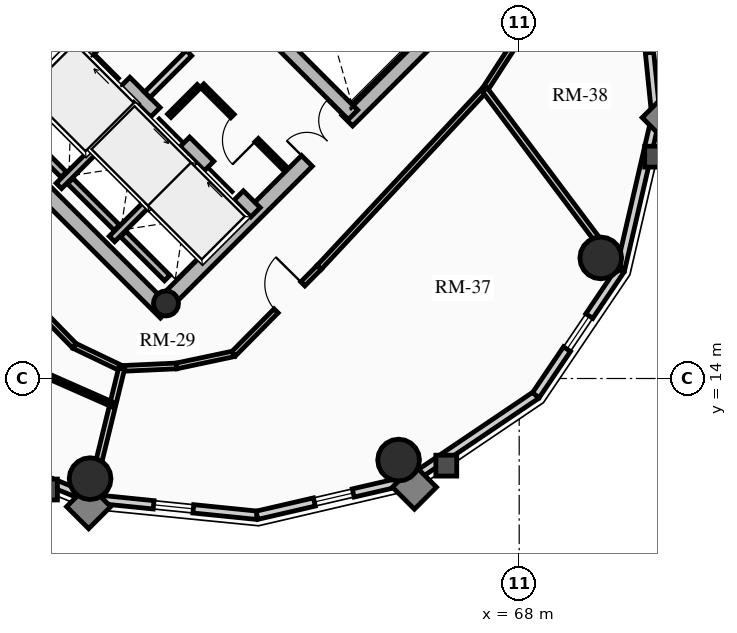
"""IFC4 building model, lengths in metres.
Left out: names, types, materials, properties, quantities, classifications, styles, units other than length and angle.
Written with IfcOpenShell. Run it as: python <this file> out.ifc"""

import sys

from ifc_helpers import new_model, si_unit, direction, frame, frame_2d, origin, origin_2d, place, context, subcontext, project, spatial, rectangle, circle, hollow_circle, extrude, source, transform, mapped, element, fill, save


model = new_model("IFC4")
c1 = context("Model", 3, precision=1e-05, world=origin(), true_north=direction((0.0, 1.0)))
c2 = subcontext(c1, "Body", "Model", "MODEL_VIEW")
j1 = project(units=[si_unit("LENGTHUNIT", "METRE"), si_unit("PLANEANGLEUNIT", "RADIAN")], contexts=[c1])
p1 = place(None, origin())
s1 = spatial("IfcSite", under=j1, at=p1, CompositionType="ELEMENT")
p2 = place(p1, origin())
s2 = spatial("IfcBuilding", under=s1, at=p2, CompositionType="ELEMENT")
p3 = place(p2, frame((0.0, 0.0, 219.94)))
s3 = spatial("IfcBuildingStorey", under=s2, at=p3, CompositionType="ELEMENT", Elevation=219.94)
p4 = place(p3, frame((58.702, 15.732, 0.0), z_axis=(0.0, 0.0, 1.0), x_axis=(-0.707106781187, 0.707106781187, 0.0)))
e1 = element("IfcWall", 1, at=p4, inside=s3, PredefinedType="SHEAR", context=c2, shape_type="SweptSolid", body=[
    extrude(rectangle(XDim=14.1, YDim=0.4, at=frame_2d((7.05, 0.0))), origin(), (0.0, 0.0, 1.0), 2.91),
])
p5 = place(p3, frame((58.561, 15.873, 0.0), z_axis=(0.0, 0.0, 1.0), x_axis=(0.707106781187, 0.707106781187, 0.0)))
e2 = element("IfcWall", 2, at=p5, inside=s3, PredefinedType="SHEAR", context=c2, shape_type="SweptSolid", body=[
    extrude(rectangle(XDim=10.7, YDim=0.4, at=frame_2d((5.35, 0.0))), origin(), (0.0, 0.0, 1.0), 2.91),
])
m1 = source(origin(), c2, "Body", "SweptSolid", [
    extrude(rectangle(XDim=1.5, YDim=2.02, at=frame_2d((0.75, 1.01))), frame((0.0, 0.21, 0.0), z_axis=(0.0, -1.0, 0.0), x_axis=(1.0, 0.0, 0.0)), (0.0, 0.0, 1.0), 0.42),
])
p6 = place(p5, frame((5.45, 0.0, 0.0)))
e3 = element("IfcOpeningElement", 3, at=p6, cuts=e2, PredefinedType="OPENING", context=c2, shape_type="MappedRepresentation", body=[
    mapped(m1, transform((0.0, 0.0, 0.0), x_axis=(1.0, 0.0, 0.0), y_axis=(0.0, 1.0, 0.0), z_axis=(0.0, 0.0, 1.0), scale=1.0)),
])
p7 = place(p3, frame((61.06, 18.373, 0.0), z_axis=(0.0, 0.0, 1.0), x_axis=(-0.707106781187, 0.707106781187, 0.0)))
e4 = element("IfcWall", 4, at=p7, inside=s3, PredefinedType="SHEAR", context=c2, shape_type="SweptSolid", body=[
    extrude(rectangle(XDim=13.7, YDim=0.35, at=frame_2d((6.85, 0.0))), origin(), (0.0, 0.0, 1.0), 2.91),
])
m2 = source(origin(), c2, "Body", "SweptSolid", [
    extrude(rectangle(XDim=1.1, YDim=2.015, at=frame_2d((0.55, 1.007))), frame((0.0, 0.185, 0.0), z_axis=(0.0, -1.0, 0.0), x_axis=(1.0, 0.0, 0.0)), (0.0, 0.0, 1.0), 0.37),
])
p8 = place(p7, frame((4.85, 0.0, 0.0)))
e5 = element("IfcOpeningElement", 5, at=p8, cuts=e4, PredefinedType="OPENING", context=c2, shape_type="MappedRepresentation", body=[
    mapped(m2, transform((0.0, 0.0, 0.0), x_axis=(1.0, 0.0, 0.0), y_axis=(0.0, 1.0, 0.0), z_axis=(0.0, 0.0, 1.0), scale=1.0)),
])
p9 = place(p7, frame((0.625, 0.0, 0.0)))
e6 = element("IfcOpeningElement", 6, at=p9, cuts=e4, PredefinedType="OPENING", context=c2, shape_type="MappedRepresentation", body=[
    mapped(m2, transform((0.0, 0.0, 0.0), x_axis=(1.0, 0.0, 0.0), y_axis=(0.0, 1.0, 0.0), z_axis=(0.0, 0.0, 1.0), scale=1.0)),
])
p10 = place(p7, frame((2.625, 0.0, 0.0)))
e7 = element("IfcOpeningElement", 7, at=p10, cuts=e4, PredefinedType="OPENING", context=c2, shape_type="MappedRepresentation", body=[
    mapped(m2, transform((0.0, 0.0, 0.0), x_axis=(1.0, 0.0, 0.0), y_axis=(0.0, 1.0, 0.0), z_axis=(0.0, 0.0, 1.0), scale=1.0)),
])
m3 = source(origin(), c2, "Body", "SweptSolid", [
    extrude(rectangle(XDim=1.15, YDim=2.02, at=frame_2d((0.575, 1.01))), frame((0.0, 0.185, 0.0), z_axis=(0.0, -1.0, 0.0), x_axis=(1.0, 0.0, 0.0)), (0.0, 0.0, 1.0), 0.37),
])
p11 = place(p7, frame((7.27, 0.0, 0.0)))
e8 = element("IfcOpeningElement", 8, at=p11, cuts=e4, PredefinedType="OPENING", context=c2, shape_type="MappedRepresentation", body=[
    mapped(m3, transform((0.0, 0.0, 0.0), x_axis=(1.0, 0.0, 0.0), y_axis=(0.0, 1.0, 0.0), z_axis=(0.0, 0.0, 1.0), scale=1.0)),
])
p12 = place(p3, frame((63.627, 20.94, 0.0), z_axis=(0.0, 0.0, 1.0), x_axis=(-0.707119496762, 0.707094065383, 0.0)))
e9 = element("IfcWall", 9, at=p12, inside=s3, PredefinedType="SHEAR", context=c2, shape_type="SweptSolid", body=[
    extrude(rectangle(XDim=9.6, YDim=0.35, at=frame_2d((4.8, 0.0))), origin(), (0.0, 0.0, 1.0), 2.91),
])
p13 = place(p12, frame((5.28, 0.0, 0.0)))
e10 = element("IfcOpeningElement", 10, at=p13, cuts=e9, PredefinedType="OPENING", context=c2, shape_type="MappedRepresentation", body=[
    mapped(m3, transform((0.0, 0.0, 0.0), x_axis=(1.0, 0.0, 0.0), y_axis=(0.0, 1.0, 0.0), z_axis=(0.0, 0.0, 1.0), scale=1.0)),
])
p14 = place(p3, frame((53.784, 21.003, 0.0), z_axis=(0.0, 0.0, 1.0), x_axis=(0.707106781187, 0.707106781187, 0.0)))
e11 = element("IfcWall", 11, at=p14, inside=s3, PredefinedType="SHEAR", context=c2, shape_type="SweptSolid", body=[
    extrude(rectangle(XDim=3.285, YDim=0.35, at=frame_2d((1.643, 0.0))), origin(), (0.0, 0.0, 1.0), 2.91),
])
p15 = place(p3, frame((58.706, 15.976, 0.0), z_axis=(0.0, 0.0, 1.0), x_axis=(0.707106781187, 0.707106781187, 0.0)))
e12 = element("IfcColumn", 12, at=p15, inside=s3, PredefinedType="COLUMN", context=c2, shape_type="SweptSolid", body=[
    extrude(hollow_circle(Radius=0.33, WallThickness=0.025, at=origin_2d()), origin(), (0.0, 0.0, 1.0), 2.91),
])
for number, where, z_axis, x_axis in (
    (13, (56.709, 11.365, 0.0), (0.0, 0.0, 1.0), (1.0, 0.0, 0.0)),
    (14, (64.827, 11.854, 0.0), (0.0, 0.0, 1.0), (1.0, 0.0, 0.0)),
    (15, (70.146, 17.173, 0.0), (0.0, 0.0, 1.0), (1.0, 0.0, 0.0)),
):
    element("IfcColumn", number, at=place(p3, frame(where, z_axis=z_axis, x_axis=x_axis)), inside=s3, PredefinedType="USERDEFINED", context=c2, shape_type="SweptSolid", body=[
        extrude(circle(Radius=0.55, at=origin_2d()), origin(), (0.0, 0.0, 1.0), 2.91),
    ])
p16 = place(p3, frame((56.705, 10.845, 0.0), z_axis=(0.0, 0.0, 1.0), x_axis=(-0.924447353237, 0.381309704956, 0.0)))
e16 = element("IfcWall", 16, at=p16, inside=s3, PredefinedType="SOLIDWALL", context=c2, shape_type="SweptSolid", body=[
    extrude(rectangle(XDim=4.671, YDim=0.22, at=frame_2d((2.335, 0.0))), origin(), (0.0, 0.0, 1.0), 2.322),
])
p17 = place(p3, frame((61.1, 10.401, 0.0), z_axis=(0.0, 0.0, 1.0), x_axis=(-0.994929930991, 0.100570534541, 0.0)))
e17 = element("IfcWall", 17, at=p17, inside=s3, PredefinedType="SOLIDWALL", context=c2, shape_type="SweptSolid", body=[
    extrude(rectangle(XDim=4.418, YDim=0.22, at=frame_2d((2.209, 0.0))), origin(), (0.0, 0.0, 1.0), 2.322),
])
m4 = source(origin(), c2, "Body", "SweptSolid", [
    extrude(rectangle(XDim=1.05, YDim=1.3, at=frame_2d((0.525, 0.65))), frame((0.0, 0.12, 0.0), z_axis=(0.0, -1.0, 0.0), x_axis=(1.0, 0.0, 0.0)), (0.0, 0.0, 1.0), 0.24),
])
p18 = place(p17, frame((1.684, 0.0, 0.65)))
e18 = element("IfcOpeningElement", 18, at=p18, cuts=e17, PredefinedType="OPENING", context=c2, shape_type="MappedRepresentation", body=[
    mapped(m4, transform((0.0, 0.0, 0.0), x_axis=(1.0, 0.0, 0.0), y_axis=(0.0, 1.0, 0.0), z_axis=(0.0, 0.0, 1.0), scale=1.0)),
])
p19 = place(p3, frame((65.144, 11.337, 0.0), z_axis=(0.0, 0.0, 1.0), x_axis=(-0.974249228678, -0.225473813158, 0.0)))
e19 = element("IfcWall", 19, at=p19, inside=s3, PredefinedType="SOLIDWALL", context=c2, shape_type="SweptSolid", body=[
    extrude(rectangle(XDim=4.15, YDim=0.22, at=frame_2d((2.075, 0.0))), origin(), (0.0, 0.0, 1.0), 2.322),
])
p20 = place(p19, frame((1.55, 0.0, 0.65)))
e20 = element("IfcOpeningElement", 20, at=p20, cuts=e19, PredefinedType="OPENING", context=c2, shape_type="MappedRepresentation", body=[
    mapped(m4, transform((0.0, 0.0, 0.0), x_axis=(1.0, 0.0, 0.0), y_axis=(0.0, 1.0, 0.0), z_axis=(0.0, 0.0, 1.0), scale=1.0)),
])
p21 = place(p3, frame((68.439, 13.561, 0.0), z_axis=(0.0, 0.0, 1.0), x_axis=(-0.828833723692, -0.559495003079, 0.0)))
e21 = element("IfcWall", 21, at=p21, inside=s3, PredefinedType="SOLIDWALL", context=c2, shape_type="SweptSolid", body=[
    extrude(rectangle(XDim=3.976, YDim=0.22, at=frame_2d((1.988, 0.0))), origin(), (0.0, 0.0, 1.0), 2.322),
])
p22 = place(p3, frame((70.663, 16.856, 0.0), z_axis=(0.0, 0.0, 1.0), x_axis=(-0.559495003079, -0.828833723692, 0.0)))
e22 = element("IfcWall", 22, at=p22, inside=s3, PredefinedType="SOLIDWALL", context=c2, shape_type="SweptSolid", body=[
    extrude(rectangle(XDim=3.976, YDim=0.22, at=frame_2d((1.988, 0.0))), origin(), (0.0, 0.0, 1.0), 2.322),
])
p23 = place(p22, frame((1.463, 0.0, 0.65)))
e23 = element("IfcOpeningElement", 23, at=p23, cuts=e22, PredefinedType="OPENING", context=c2, shape_type="MappedRepresentation", body=[
    mapped(m4, transform((0.0, 0.0, 0.0), x_axis=(1.0, 0.0, 0.0), y_axis=(0.0, 1.0, 0.0), z_axis=(0.0, 0.0, 1.0), scale=1.0)),
])
p24 = place(p3, frame((71.599, 20.9, 0.0), z_axis=(0.0, 0.0, 1.0), x_axis=(-0.225473813158, -0.974249228678, 0.0)))
e24 = element("IfcWall", 24, at=p24, inside=s3, PredefinedType="SOLIDWALL", context=c2, shape_type="SweptSolid", body=[
    extrude(rectangle(XDim=4.15, YDim=0.22, at=frame_2d((2.075, 0.0))), origin(), (0.0, 0.0, 1.0), 2.322),
])
p25 = place(p3, frame((71.155, 25.295, 0.0), z_axis=(0.0, 0.0, 1.0), x_axis=(0.100570534541, -0.994929930991, 0.0)))
e25 = element("IfcWall", 25, at=p25, inside=s3, PredefinedType="SOLIDWALL", context=c2, shape_type="SweptSolid", body=[
    extrude(rectangle(XDim=4.418, YDim=0.22, at=frame_2d((2.209, 0.0))), origin(), (0.0, 0.0, 1.0), 2.322),
])
p26 = place(p25, frame((1.684, 0.0, 0.65)))
e26 = element("IfcOpeningElement", 26, at=p26, cuts=e25, PredefinedType="OPENING", context=c2, shape_type="MappedRepresentation", body=[
    mapped(m4, transform((0.0, 0.0, 0.0), x_axis=(1.0, 0.0, 0.0), y_axis=(0.0, 1.0, 0.0), z_axis=(0.0, 0.0, 1.0), scale=1.0)),
])
p27 = place(p3, frame((55.888, 19.069, 0.0), z_axis=(0.0, 0.0, 1.0), x_axis=(0.707106781187, 0.707106781187, 0.0)))
e27 = element("IfcWall", 27, at=p27, inside=s3, PredefinedType="SHEAR", context=c2, shape_type="SweptSolid", body=[
    extrude(rectangle(XDim=2.97, YDim=0.2, at=frame_2d((1.485, 0.0))), origin(), (0.0, 0.0, 1.0), 2.91),
])
p28 = place(p3, frame((56.015, 19.366, 0.0), z_axis=(0.0, 0.0, 1.0), x_axis=(-0.707106781187, 0.707106781187, 0.0)))
e28 = element("IfcWall", 28, at=p28, inside=s3, PredefinedType="SHEAR", context=c2, shape_type="SweptSolid", body=[
    extrude(rectangle(XDim=2.44, YDim=0.2, at=frame_2d((1.22, 0.0))), origin(), (0.0, 0.0, 1.0), 2.91),
])
p29 = place(p3, frame((57.284, 17.673, 0.0), z_axis=(0.0, 0.0, 1.0), x_axis=(0.707147878904, 0.70706568108, 0.0)))
e29 = element("IfcWall", 29, at=p29, inside=s3, PredefinedType="SHEAR", context=c2, shape_type="SweptSolid", body=[
    extrude(rectangle(XDim=2.97, YDim=0.2, at=frame_2d((1.485, 0.0))), origin(), (0.0, 0.0, 1.0), 2.91),
])
p30 = place(p3, frame((57.412, 17.97, 0.0), z_axis=(0.0, 0.0, 1.0), x_axis=(-0.707106781187, 0.707106781187, 0.0)))
e30 = element("IfcWall", 30, at=p30, inside=s3, PredefinedType="SHEAR", context=c2, shape_type="SweptSolid", body=[
    extrude(rectangle(XDim=1.735, YDim=0.2, at=frame_2d((0.867, 0.0))), origin(), (0.0, 0.0, 1.0), 2.91),
])
p31 = place(p3, frame((58.737, 16.644, 0.0), z_axis=(0.0, 0.0, 1.0), x_axis=(-0.707032117043, 0.707181437447, 0.0)))
e31 = element("IfcWall", 31, at=p31, inside=s3, PredefinedType="SHEAR", context=c2, shape_type="SweptSolid", body=[
    extrude(rectangle(XDim=1.635, YDim=0.2, at=frame_2d((0.817, 0.0))), origin(), (0.0, 0.0, 1.0), 2.91),
])
p32 = place(p3, frame((58.214, 21.467, 0.0), z_axis=(0.0, 0.0, 1.0), x_axis=(0.707106781187, 0.707106781187, 0.0)))
e32 = element("IfcWall", 32, at=p32, inside=s3, PredefinedType="PARTITIONING", context=c2, shape_type="SweptSolid", body=[
    extrude(rectangle(XDim=3.28, YDim=0.2, at=frame_2d((1.64, 0.0))), origin(), (0.0, 0.0, 1.0), 2.685),
])
m5 = source(origin(), c2, "Body", "SweptSolid", [
    extrude(rectangle(XDim=1.5, YDim=2.02, at=frame_2d((0.75, 1.01))), frame((0.0, 0.11, 0.0), z_axis=(0.0, -1.0, 0.0), x_axis=(1.0, 0.0, 0.0)), (0.0, 0.0, 1.0), 0.22),
])
p33 = place(p32, frame((1.55, 0.0, 0.0)))
e33 = element("IfcOpeningElement", 33, at=p33, cuts=e32, PredefinedType="OPENING", context=c2, shape_type="MappedRepresentation", body=[
    mapped(m5, transform((0.0, 0.0, 0.0), x_axis=(1.0, 0.0, 0.0), y_axis=(0.0, 1.0, 0.0), z_axis=(0.0, 0.0, 1.0), scale=1.0)),
])
p34 = place(p3, frame((61.835, 19.529, 0.0), z_axis=(0.0, 0.0, 1.0), x_axis=(-0.707146413884, 0.707067146267, 0.0)))
e34 = element("IfcWall", 34, at=p34, inside=s3, PredefinedType="PARTITIONING", context=c2, shape_type="SweptSolid", body=[
    extrude(rectangle(XDim=3.08, YDim=0.125, at=frame_2d((1.54, 0.0))), origin(), (0.0, 0.0, 1.0), 2.685),
])
m6 = source(origin(), c2, "Body", "SweptSolid", [
    extrude(rectangle(XDim=0.9, YDim=2.005, at=frame_2d((0.45, 1.002))), frame((0.0, 0.073, 0.0), z_axis=(0.0, -1.0, 0.0), x_axis=(1.0, 0.0, 0.0)), (0.0, 0.0, 1.0), 0.145),
])
p35 = place(p34, frame((1.05, 0.0, 0.0)))
e35 = element("IfcOpeningElement", 35, at=p35, cuts=e34, PredefinedType="OPENING", context=c2, shape_type="MappedRepresentation", body=[
    mapped(m6, transform((0.0, 0.0, 0.0), x_axis=(1.0, 0.0, 0.0), y_axis=(0.0, 1.0, 0.0), z_axis=(0.0, 0.0, 1.0), scale=1.0)),
])
p36 = place(p3, frame((58.794, 20.915, 0.0), z_axis=(0.0, 0.0, 1.0), x_axis=(0.707106781187, 0.707106781187, 0.0)))
e36 = element("IfcWall", 36, at=p36, inside=s3, PredefinedType="PARTITIONING", context=c2, shape_type="SweptSolid", body=[
    extrude(rectangle(XDim=1.1, YDim=0.125, at=frame_2d((0.55, 0.0))), origin(), (0.0, 0.0, 1.0), 2.685),
])
p37 = place(p3, frame((52.126, 19.126, 0.0), z_axis=(0.0, 0.0, 1.0), x_axis=(0.698979087027, -0.715142108884, 0.0)))
e37 = element("IfcWall", 37, at=p37, inside=s3, PredefinedType="PARTITIONING", context=c2, shape_type="SweptSolid", body=[
    extrude(rectangle(XDim=5.966, YDim=0.15, at=frame_2d((2.983, 0.0))), origin(), (0.0, 0.0, 1.0), 2.322),
])
m7 = source(origin(), c2, "Body", "SweptSolid", [
    extrude(rectangle(XDim=1.05, YDim=2.015, at=frame_2d((0.525, 1.007))), frame((0.0, 0.085, 0.0), z_axis=(0.0, -1.0, 0.0), x_axis=(1.0, 0.0, 0.0)), (0.0, 0.0, 1.0), 0.17),
])
p38 = place(p37, frame((2.458, 0.0, 0.0)))
e38 = element("IfcOpeningElement", 38, at=p38, cuts=e37, PredefinedType="OPENING", context=c2, shape_type="MappedRepresentation", body=[
    mapped(m7, transform((0.0, 0.0, 0.0), x_axis=(1.0, 0.0, 0.0), y_axis=(0.0, 1.0, 0.0), z_axis=(0.0, 0.0, 1.0), scale=1.0)),
])
p39 = place(p3, frame((56.296, 14.859, 0.0), z_axis=(0.0, 0.0, 1.0), x_axis=(0.90178292445, -0.432189260823, 0.0)))
e39 = element("IfcWall", 39, at=p39, inside=s3, PredefinedType="PARTITIONING", context=c2, shape_type="SweptSolid", body=[
    extrude(rectangle(XDim=1.377, YDim=0.15, at=frame_2d((0.688, 0.0))), origin(), (0.0, 0.0, 1.0), 2.255),
])
p40 = place(p3, frame((57.538, 14.264, 0.0), z_axis=(0.0, 0.0, 1.0), x_axis=(0.99892990172, 0.046249880546, 0.0)))
e40 = element("IfcWall", 40, at=p40, inside=s3, PredefinedType="PARTITIONING", context=c2, shape_type="SweptSolid", body=[
    extrude(rectangle(XDim=1.446, YDim=0.15, at=frame_2d((0.723, 0.0))), origin(), (0.0, 0.0, 1.0), 2.322),
])
p41 = place(p3, frame((58.983, 14.331, 0.0), z_axis=(0.0, 0.0, 1.0), x_axis=(0.978328007546, 0.207061125397, 0.0)))
e41 = element("IfcWall", 41, at=p41, inside=s3, PredefinedType="PARTITIONING", context=c2, shape_type="SweptSolid", body=[
    extrude(rectangle(XDim=1.534, YDim=0.15, at=frame_2d((0.767, 0.0))), origin(), (0.0, 0.0, 1.0), 2.255),
])
p42 = place(p3, frame((60.484, 14.648, 0.0), z_axis=(0.0, 0.0, 1.0), x_axis=(0.703398221944, 0.710795991383, 0.0)))
e42 = element("IfcWall", 42, at=p42, inside=s3, PredefinedType="PARTITIONING", context=c2, shape_type="SweptSolid", body=[
    extrude(rectangle(XDim=3.201, YDim=0.15, at=frame_2d((1.601, 0.0))), origin(), (0.0, 0.0, 1.0), 2.322),
])
m8 = source(origin(), c2, "Body", "SweptSolid", [
    extrude(rectangle(XDim=1.0, YDim=2.015, at=frame_2d((0.5, 1.007))), frame((0.0, 0.085, 0.0), z_axis=(0.0, -1.0, 0.0), x_axis=(1.0, 0.0, 0.0)), (0.0, 0.0, 1.0), 0.17),
])
p43 = place(p42, frame((1.591, 0.0, 0.0)))
e43 = element("IfcOpeningElement", 43, at=p43, cuts=e42, PredefinedType="OPENING", context=c2, shape_type="MappedRepresentation", body=[
    mapped(m8, transform((0.0, 0.0, 0.0), x_axis=(1.0, 0.0, 0.0), y_axis=(0.0, 1.0, 0.0), z_axis=(0.0, 0.0, 1.0), scale=1.0)),
])
p44 = place(p3, frame((62.736, 16.924, 0.0), z_axis=(0.0, 0.0, 1.0), x_axis=(0.681946700833, 0.731401871219, 0.0)))
e44 = element("IfcWall", 44, at=p44, inside=s3, PredefinedType="PARTITIONING", context=c2, shape_type="SweptSolid", body=[
    extrude(rectangle(XDim=6.393, YDim=0.15, at=frame_2d((3.196, 0.0))), origin(), (0.0, 0.0, 1.0), 2.255),
])
p45 = place(p3, frame((67.095, 21.6, 0.0), z_axis=(0.0, 0.0, 1.0), x_axis=(0.543773190184, 0.839232219137, 0.0)))
e45 = element("IfcWall", 45, at=p45, inside=s3, PredefinedType="PARTITIONING", context=c2, shape_type="SweptSolid", body=[
    extrude(rectangle(XDim=1.823, YDim=0.15, at=frame_2d((0.911, 0.0))), origin(), (0.0, 0.0, 1.0), 2.255),
])
p46 = place(p3, frame((57.538, 14.264, 0.0), z_axis=(0.0, 0.0, 1.0), x_axis=(-0.237377006249, -0.971417601706, 0.0)))
e46 = element("IfcWall", 46, at=p46, inside=s3, PredefinedType="PARTITIONING", context=c2, shape_type="SweptSolid", body=[
    extrude(rectangle(XDim=3.499, YDim=0.16, at=frame_2d((1.75, 0.0))), origin(), (0.0, 0.0, 1.0), 2.322),
])
p47 = place(p3, frame((67.095, 21.6, 0.0), z_axis=(0.0, 0.0, 1.0), x_axis=(0.599947190798, -0.800039604178, 0.0)))
e47 = element("IfcWall", 47, at=p47, inside=s3, PredefinedType="PARTITIONING", context=c2, shape_type="SweptSolid", body=[
    extrude(rectangle(XDim=5.918, YDim=0.16, at=frame_2d((2.959, 0.0))), origin(), (0.0, 0.0, 1.0), 2.322),
])
p48 = place(p3, frame((55.204, 14.239, 0.0), z_axis=(0.0, 0.0, 1.0), x_axis=(0.914999746908, -0.403454412738, 0.0)))
e48 = element("IfcWall", 48, at=p48, inside=s3, PredefinedType="PARTITIONING", context=c2, shape_type="SweptSolid", body=[
    extrude(rectangle(XDim=2.297, YDim=0.125, at=frame_2d((1.148, 0.0))), origin(), (0.0, 0.0, 1.0), 2.255),
])
m9 = source(origin(), c2, "Body", "SweptSolid", [
    extrude(rectangle(XDim=1.05, YDim=1.3, at=frame_2d((0.525, 0.65))), frame((0.0, 0.03, 0.0), z_axis=(0.0, -1.0, 0.0), x_axis=(1.0, 0.0, 0.0)), (0.0, 0.0, 1.0), 0.06),
])
p49 = place(p18, origin())
e49 = element("IfcWindow", 49, at=p49, inside=s3, PartitioningType="SINGLE_PANEL", PredefinedType="WINDOW", context=c2, shape_type="MappedRepresentation", body=[
    mapped(m9, transform((0.0, 0.0, 0.0), x_axis=(1.0, 0.0, 0.0), y_axis=(0.0, 1.0, 0.0), z_axis=(0.0, 0.0, 1.0), scale=1.0)),
])
fill(e18, e49)
p50 = place(p20, origin())
e50 = element("IfcWindow", 50, at=p50, inside=s3, PartitioningType="SINGLE_PANEL", PredefinedType="WINDOW", context=c2, shape_type="MappedRepresentation", body=[
    mapped(m9, transform((0.0, 0.0, 0.0), x_axis=(1.0, 0.0, 0.0), y_axis=(0.0, 1.0, 0.0), z_axis=(0.0, 0.0, 1.0), scale=1.0)),
])
fill(e20, e50)
p51 = place(p23, origin())
e51 = element("IfcWindow", 51, at=p51, inside=s3, PartitioningType="SINGLE_PANEL", PredefinedType="WINDOW", context=c2, shape_type="MappedRepresentation", body=[
    mapped(m9, transform((0.0, 0.0, 0.0), x_axis=(1.0, 0.0, 0.0), y_axis=(0.0, 1.0, 0.0), z_axis=(0.0, 0.0, 1.0), scale=1.0)),
])
fill(e23, e51)
p52 = place(p26, origin())
e52 = element("IfcWindow", 52, at=p52, inside=s3, PartitioningType="SINGLE_PANEL", PredefinedType="WINDOW", context=c2, shape_type="MappedRepresentation", body=[
    mapped(m9, transform((0.0, 0.0, 0.0), x_axis=(1.0, 0.0, 0.0), y_axis=(0.0, 1.0, 0.0), z_axis=(0.0, 0.0, 1.0), scale=1.0)),
])
fill(e26, e52)
m10 = source(origin(), c2, "Body", "SweptSolid", [
    extrude(rectangle(XDim=1.1, YDim=2.015, at=frame_2d((0.55, 1.007))), frame((0.0, 0.025, 0.0), z_axis=(0.0, -1.0, 0.0), x_axis=(1.0, 0.0, 0.0)), (0.0, 0.0, 1.0), 0.05),
])
p53 = place(p8, origin())
e53 = element("IfcDoor", 53, at=p53, inside=s3, OperationType="SLIDING_TO_RIGHT", PredefinedType="DOOR", context=c2, shape_type="MappedRepresentation", body=[
    mapped(m10, transform((0.0, 0.0, 0.0), x_axis=(1.0, 0.0, 0.0), y_axis=(0.0, 1.0, 0.0), z_axis=(0.0, 0.0, 1.0), scale=1.0)),
])
fill(e5, e53)
p54 = place(p9, origin())
e54 = element("IfcDoor", 54, at=p54, inside=s3, OperationType="SLIDING_TO_RIGHT", PredefinedType="DOOR", context=c2, shape_type="MappedRepresentation", body=[
    mapped(m10, transform((0.0, 0.0, 0.0), x_axis=(1.0, 0.0, 0.0), y_axis=(0.0, 1.0, 0.0), z_axis=(0.0, 0.0, 1.0), scale=1.0)),
])
fill(e6, e54)
p55 = place(p10, origin())
e55 = element("IfcDoor", 55, at=p55, inside=s3, OperationType="SLIDING_TO_LEFT", PredefinedType="DOOR", context=c2, shape_type="MappedRepresentation", body=[
    mapped(m10, transform((0.0, 0.0, 0.0), x_axis=(1.0, 0.0, 0.0), y_axis=(0.0, 1.0, 0.0), z_axis=(0.0, 0.0, 1.0), scale=1.0)),
])
fill(e7, e55)
m11 = source(origin(), c2, "Body", "SweptSolid", [
    extrude(rectangle(XDim=1.5, YDim=2.02, at=frame_2d((0.75, 1.01))), frame((0.0, 0.025, 0.0), z_axis=(0.0, -1.0, 0.0), x_axis=(1.0, 0.0, 0.0)), (0.0, 0.0, 1.0), 0.05),
])
p56 = place(p6, origin())
e56 = element("IfcDoor", 56, at=p56, inside=s3, OperationType="DOUBLE_DOOR_SINGLE_SWING", PredefinedType="DOOR", context=c2, shape_type="MappedRepresentation", body=[
    mapped(m11, transform((0.0, 0.0, 0.0), x_axis=(1.0, 0.0, 0.0), y_axis=(0.0, 1.0, 0.0), z_axis=(0.0, 0.0, 1.0), scale=1.0)),
])
fill(e3, e56)
p57 = place(p33, origin())
e57 = element("IfcDoor", 57, at=p57, inside=s3, OperationType="DOUBLE_DOOR_SINGLE_SWING", PredefinedType="DOOR", context=c2, shape_type="MappedRepresentation", body=[
    mapped(m11, transform((0.0, 0.0, 0.0), x_axis=(1.0, 0.0, 0.0), y_axis=(0.0, 1.0, 0.0), z_axis=(0.0, 0.0, 1.0), scale=1.0)),
])
fill(e33, e57)
m12 = source(origin(), c2, "Body", "SweptSolid", [
    extrude(rectangle(XDim=0.9, YDim=2.005, at=frame_2d((0.45, 1.002))), frame((0.0, 0.025, 0.0), z_axis=(0.0, -1.0, 0.0), x_axis=(1.0, 0.0, 0.0)), (0.0, 0.0, 1.0), 0.05),
])
p58 = place(p35, origin())
e58 = element("IfcDoor", 58, at=p58, inside=s3, OperationType="SINGLE_SWING_LEFT", PredefinedType="DOOR", context=c2, shape_type="MappedRepresentation", body=[
    mapped(m12, transform((0.0, 0.0, 0.0), x_axis=(1.0, 0.0, 0.0), y_axis=(0.0, 1.0, 0.0), z_axis=(0.0, 0.0, 1.0), scale=1.0)),
])
fill(e35, e58)
m13 = source(origin(), c2, "Body", "SweptSolid", [
    extrude(rectangle(XDim=1.0, YDim=2.015, at=frame_2d((0.5, 1.007))), frame((0.0, 0.025, 0.0), z_axis=(0.0, -1.0, 0.0), x_axis=(1.0, 0.0, 0.0)), (0.0, 0.0, 1.0), 0.05),
])
p59 = place(p43, origin())
e59 = element("IfcDoor", 59, at=p59, inside=s3, OperationType="SINGLE_SWING_RIGHT", PredefinedType="DOOR", context=c2, shape_type="MappedRepresentation", body=[
    mapped(m13, transform((0.0, 0.0, 0.0), x_axis=(1.0, 0.0, 0.0), y_axis=(0.0, 1.0, 0.0), z_axis=(0.0, 0.0, 1.0), scale=1.0)),
])
fill(e43, e59)
save(model, sys.argv[1])
